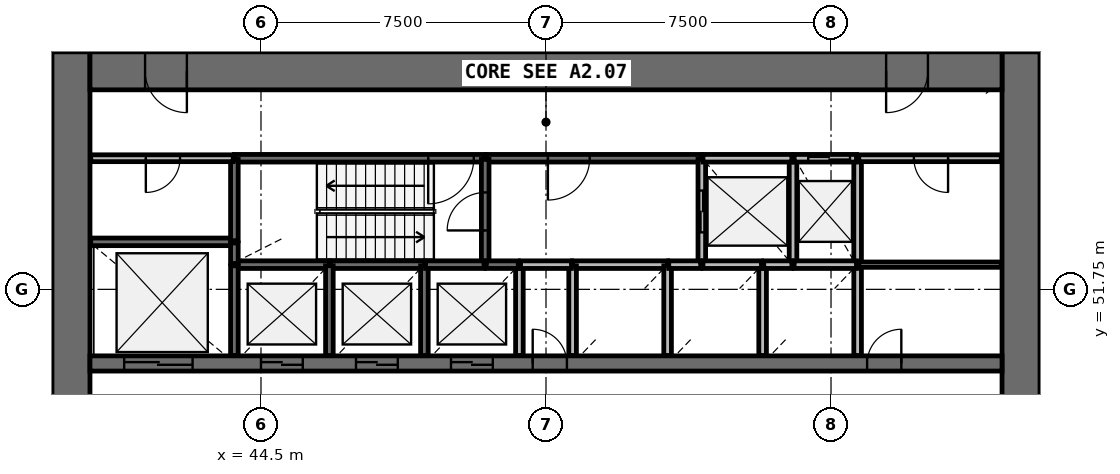
"""IFC4 building model, lengths in metres.
Left out: names, types, materials, properties, quantities, classifications, styles, units other than length and angle.
Written with IfcOpenShell. Run it as: python <this file> out.ifc"""

import sys

from ifc_helpers import new_model, si_unit, direction, frame, frame_2d, origin, place, context, subcontext, project, spatial, rectangle, extrude, source, transform, mapped, element, fill, save


model = new_model("IFC4")
c1 = context("Model", 3, precision=1e-05, world=origin(), true_north=direction((0.0, 1.0)))
c2 = subcontext(c1, "Body", "Model", "MODEL_VIEW")
j1 = project(units=[si_unit("LENGTHUNIT", "METRE"), si_unit("PLANEANGLEUNIT", "RADIAN")], contexts=[c1])
p1 = place(None, origin())
s1 = spatial("IfcSite", under=j1, at=p1, CompositionType="ELEMENT")
p2 = place(p1, origin())
s2 = spatial("IfcBuilding", under=s1, at=p2, CompositionType="ELEMENT")
p3 = place(p2, frame((0.0, 0.0, 27.0)))
s3 = spatial("IfcBuildingStorey", under=s2, at=p3, CompositionType="ELEMENT", Elevation=27.0)
p4 = place(p3, frame((64.5, 38.0, 0.0), z_axis=(0.0, 0.0, 1.0), x_axis=(0.0, 1.0, 0.0)))
e1 = element("IfcWall", 1, at=p4, inside=s3, PredefinedType="SHEAR", context=c2, shape_type="SweptSolid", body=[
    extrude(rectangle(XDim=20.0, YDim=1.0, at=frame_2d((10.0, 0.0))), origin(), (0.0, 0.0, 1.0), 4.4),
])
p5 = place(p4, frame((9.1, 0.0, 0.0)))
e2 = element("IfcOpeningElement", 2, at=p5, cuts=e1, PredefinedType="OPENING", context=c2, shape_type="SweptSolid", body=[
    extrude(rectangle(XDim=1.8, YDim=2.1, at=frame_2d((0.9, 1.05))), frame((0.0, 0.51, 0.0), z_axis=(0.0, -1.0, 0.0), x_axis=(1.0, 0.0, 0.0)), (0.0, 0.0, 1.0), 1.02),
])
p6 = place(p3, frame((39.5, 58.0, 0.0), z_axis=(0.0, 0.0, 1.0), x_axis=(0.0, -1.0, 0.0)))
e3 = element("IfcWall", 3, at=p6, inside=s3, PredefinedType="SHEAR", context=c2, shape_type="SweptSolid", body=[
    extrude(rectangle(XDim=20.0, YDim=1.0, at=frame_2d((10.0, 0.0))), origin(), (0.0, 0.0, 1.0), 4.4),
])
p7 = place(p6, frame((9.1, 0.0, 0.0)))
e4 = element("IfcOpeningElement", 4, at=p7, cuts=e3, PredefinedType="OPENING", context=c2, shape_type="SweptSolid", body=[
    extrude(rectangle(XDim=1.8, YDim=2.1, at=frame_2d((0.9, 1.05))), frame((0.0, 0.51, 0.0), z_axis=(0.0, -1.0, 0.0), x_axis=(1.0, 0.0, 0.0)), (0.0, 0.0, 1.0), 1.02),
])
p8 = place(p3, frame((64.0, 57.5, 0.0), z_axis=(0.0, 0.0, 1.0), x_axis=(-1.0, 0.0, 0.0)))
e5 = element("IfcWall", 5, at=p8, inside=s3, PredefinedType="SHEAR", context=c2, shape_type="SweptSolid", body=[
    extrude(rectangle(XDim=24.0, YDim=1.0, at=frame_2d((12.0, 0.0))), origin(), (0.0, 0.0, 1.0), 4.4),
])
p9 = place(p8, frame((21.45, 0.0, 0.0)))
e6 = element("IfcOpeningElement", 6, at=p9, cuts=e5, PredefinedType="OPENING", context=c2, shape_type="SweptSolid", body=[
    extrude(rectangle(XDim=1.1, YDim=2.1, at=frame_2d((0.55, 1.05))), frame((0.0, 0.51, 0.0), z_axis=(0.0, -1.0, 0.0), x_axis=(1.0, 0.0, 0.0)), (0.0, 0.0, 1.0), 1.02),
])
p10 = place(p8, frame((1.95, 0.0, 0.0)))
e7 = element("IfcOpeningElement", 7, at=p10, cuts=e5, PredefinedType="OPENING", context=c2, shape_type="SweptSolid", body=[
    extrude(rectangle(XDim=1.1, YDim=2.1, at=frame_2d((0.55, 1.05))), frame((0.0, 0.51, 0.0), z_axis=(0.0, -1.0, 0.0), x_axis=(1.0, 0.0, 0.0)), (0.0, 0.0, 1.0), 1.02),
])
p11 = place(p3, frame((40.0, 49.8, 0.0), z_axis=(0.0, 0.0, 1.0), x_axis=(1.0, 0.0, 0.0)))
e8 = element("IfcWall", 8, at=p11, inside=s3, PredefinedType="SHEAR", context=c2, shape_type="SweptSolid", body=[
    extrude(rectangle(XDim=24.0, YDim=0.4, at=frame_2d((12.0, 0.0))), origin(), (0.0, 0.0, 1.0), 4.4),
])
p12 = place(p11, frame((4.5, 0.0, 0.0)))
e9 = element("IfcOpeningElement", 9, at=p12, cuts=e8, PredefinedType="OPENING", context=c2, shape_type="SweptSolid", body=[
    extrude(rectangle(XDim=1.1, YDim=2.1, at=frame_2d((0.55, 1.05))), frame((0.0, 0.21, 0.0), z_axis=(0.0, -1.0, 0.0), x_axis=(1.0, 0.0, 0.0)), (0.0, 0.0, 1.0), 0.42),
])
p13 = place(p11, frame((7.0, 0.0, 0.0)))
e10 = element("IfcOpeningElement", 10, at=p13, cuts=e8, PredefinedType="OPENING", context=c2, shape_type="SweptSolid", body=[
    extrude(rectangle(XDim=1.1, YDim=2.1, at=frame_2d((0.55, 1.05))), frame((0.0, 0.21, 0.0), z_axis=(0.0, -1.0, 0.0), x_axis=(1.0, 0.0, 0.0)), (0.0, 0.0, 1.0), 0.42),
])
p14 = place(p11, frame((9.5, 0.0, 0.0)))
e11 = element("IfcOpeningElement", 11, at=p14, cuts=e8, PredefinedType="OPENING", context=c2, shape_type="SweptSolid", body=[
    extrude(rectangle(XDim=1.1, YDim=2.1, at=frame_2d((0.55, 1.05))), frame((0.0, 0.21, 0.0), z_axis=(0.0, -1.0, 0.0), x_axis=(1.0, 0.0, 0.0)), (0.0, 0.0, 1.0), 0.42),
])
p15 = place(p11, frame((0.9, 0.0, 0.0)))
e12 = element("IfcOpeningElement", 12, at=p15, cuts=e8, PredefinedType="OPENING", context=c2, shape_type="SweptSolid", body=[
    extrude(rectangle(XDim=1.8, YDim=2.4, at=frame_2d((0.9, 1.2))), frame((0.0, 0.21, 0.0), z_axis=(0.0, -1.0, 0.0), x_axis=(1.0, 0.0, 0.0)), (0.0, 0.0, 1.0), 0.42),
])
p16 = place(p11, frame((20.45, 0.0, 0.0)))
e13 = element("IfcOpeningElement", 13, at=p16, cuts=e8, PredefinedType="OPENING", context=c2, shape_type="SweptSolid", body=[
    extrude(rectangle(XDim=0.9, YDim=2.1, at=frame_2d((0.45, 1.05))), frame((0.0, 0.21, 0.0), z_axis=(0.0, -1.0, 0.0), x_axis=(1.0, 0.0, 0.0)), (0.0, 0.0, 1.0), 0.42),
])
p17 = place(p11, frame((11.65, 0.0, 0.0)))
e14 = element("IfcOpeningElement", 14, at=p17, cuts=e8, PredefinedType="OPENING", context=c2, shape_type="SweptSolid", body=[
    extrude(rectangle(XDim=0.9, YDim=2.1, at=frame_2d((0.45, 1.05))), frame((0.0, 0.21, 0.0), z_axis=(0.0, -1.0, 0.0), x_axis=(1.0, 0.0, 0.0)), (0.0, 0.0, 1.0), 0.42),
])
p18 = place(p3, frame((50.4, 55.2, 0.0), z_axis=(0.0, 0.0, 1.0), x_axis=(-1.0, 0.0, 0.0)))
e15 = element("IfcWall", 15, at=p18, inside=s3, PredefinedType="SOLIDWALL", context=c2, shape_type="SweptSolid", body=[
    extrude(rectangle(XDim=6.6, YDim=0.2, at=frame_2d((3.3, 0.0))), origin(), (0.0, 0.0, 1.0), 3.95),
])
p19 = place(p18, frame((0.3, 0.0, 0.0)))
e16 = element("IfcOpeningElement", 16, at=p19, cuts=e15, PredefinedType="OPENING", context=c2, shape_type="SweptSolid", body=[
    extrude(rectangle(XDim=1.2, YDim=2.1, at=frame_2d((0.6, 1.05))), frame((0.0, 0.11, 0.0), z_axis=(0.0, -1.0, 0.0), x_axis=(1.0, 0.0, 0.0)), (0.0, 0.0, 1.0), 0.22),
])
p20 = place(p3, frame((56.1, 55.2, 0.0), z_axis=(0.0, 0.0, 1.0), x_axis=(-1.0, 0.0, 0.0)))
e17 = element("IfcWall", 17, at=p20, inside=s3, PredefinedType="SOLIDWALL", context=c2, shape_type="SweptSolid", body=[
    extrude(rectangle(XDim=5.67, YDim=0.2, at=frame_2d((2.835, 0.0))), origin(), (0.0, 0.0, 1.0), 3.95),
])
p21 = place(p20, frame((2.95, 0.0, 0.0)))
e18 = element("IfcOpeningElement", 18, at=p21, cuts=e17, PredefinedType="OPENING", context=c2, shape_type="SweptSolid", body=[
    extrude(rectangle(XDim=1.1, YDim=2.1, at=frame_2d((0.55, 1.05))), frame((0.0, 0.11, 0.0), z_axis=(0.0, -1.0, 0.0), x_axis=(1.0, 0.0, 0.0)), (0.0, 0.0, 1.0), 0.22),
])
p22 = place(p3, frame((43.8, 53.0, 0.0), z_axis=(0.0, 0.0, 1.0), x_axis=(-1.0, 0.0, 0.0)))
e19 = element("IfcWall", 19, at=p22, inside=s3, PredefinedType="SOLIDWALL", context=c2, shape_type="SweptSolid", body=[
    extrude(rectangle(XDim=3.78, YDim=0.2, at=frame_2d((1.89, 0.0))), origin(), (0.0, 0.0, 1.0), 3.95),
])
p23 = place(p3, frame((50.4, 52.4, 0.0), z_axis=(0.0, 0.0, 1.0), x_axis=(0.0, 1.0, 0.0)))
e20 = element("IfcWall", 20, at=p23, inside=s3, PredefinedType="SOLIDWALL", context=c2, shape_type="SweptSolid", body=[
    extrude(rectangle(XDim=2.77, YDim=0.2, at=frame_2d((1.385, 0.0))), origin(), (0.0, 0.0, 1.0), 3.95),
])
p24 = place(p23, frame((0.9, 0.0, 0.0)))
e21 = element("IfcOpeningElement", 21, at=p24, cuts=e20, PredefinedType="OPENING", context=c2, shape_type="SweptSolid", body=[
    extrude(rectangle(XDim=1.0, YDim=2.1, at=frame_2d((0.5, 1.05))), frame((0.0, 0.11, 0.0), z_axis=(0.0, -1.0, 0.0), x_axis=(1.0, 0.0, 0.0)), (0.0, 0.0, 1.0), 0.22),
])
p25 = place(p3, frame((56.1, 55.17, 0.0), z_axis=(0.0, 0.0, 1.0), x_axis=(0.0, -1.0, 0.0)))
e22 = element("IfcWall", 22, at=p25, inside=s3, PredefinedType="SOLIDWALL", context=c2, shape_type="SweptSolid", body=[
    extrude(rectangle(XDim=2.77, YDim=0.2, at=frame_2d((1.385, 0.0))), origin(), (0.0, 0.0, 1.0), 3.95),
])
p26 = place(p25, frame((0.82, 0.0, 0.0)))
e23 = element("IfcOpeningElement", 23, at=p26, cuts=e22, PredefinedType="OPENING", context=c2, shape_type="SweptSolid", body=[
    extrude(rectangle(XDim=1.1, YDim=2.1, at=frame_2d((0.55, 1.05))), frame((0.0, 0.11, 0.0), z_axis=(0.0, -1.0, 0.0), x_axis=(1.0, 0.0, 0.0)), (0.0, 0.0, 1.0), 0.22),
])
for number, where, z_axis, x_axis in (
    (24, (58.5, 52.4, 0.0), (0.0, 0.0, 1.0), (0.0, 1.0, 0.0)),
    (25, (60.2, 52.4, 0.0), (0.0, 0.0, 1.0), (0.0, 1.0, 0.0)),
):
    element("IfcWall", number, at=place(p3, frame(where, z_axis=z_axis, x_axis=x_axis)), inside=s3, PredefinedType="SOLIDWALL", context=c2, shape_type="SweptSolid", body=[
        extrude(rectangle(XDim=2.8, YDim=0.2, at=frame_2d((1.4, 0.0))), origin(), (0.0, 0.0, 1.0), 3.95),
    ])
p27 = place(p3, frame((46.3, 52.4, 0.0), z_axis=(0.0, 0.0, 1.0), x_axis=(-1.0, 0.0, 0.0)))
e26 = element("IfcWall", 26, at=p27, inside=s3, PredefinedType="SOLIDWALL", context=c2, shape_type="SweptSolid", body=[
    extrude(rectangle(XDim=2.5, YDim=0.2, at=frame_2d((1.25, 0.0))), origin(), (0.0, 0.0, 1.0), 3.95),
])
p28 = place(p3, frame((48.8, 52.4, 0.0), z_axis=(0.0, 0.0, 1.0), x_axis=(-1.0, 0.0, 0.0)))
e27 = element("IfcWall", 27, at=p28, inside=s3, PredefinedType="SOLIDWALL", context=c2, shape_type="SweptSolid", body=[
    extrude(rectangle(XDim=2.47, YDim=0.2, at=frame_2d((1.235, 0.0))), origin(), (0.0, 0.0, 1.0), 3.95),
])
p29 = place(p3, frame((55.2, 52.4, 0.0), z_axis=(0.0, 0.0, 1.0), x_axis=(-1.0, 0.0, 0.0)))
e28 = element("IfcWall", 28, at=p29, inside=s3, PredefinedType="SOLIDWALL", context=c2, shape_type="SweptSolid", body=[
    extrude(rectangle(XDim=2.5, YDim=0.2, at=frame_2d((1.25, 0.0))), origin(), (0.0, 0.0, 1.0), 3.95),
])
p30 = place(p3, frame((58.47, 55.2, 0.0), z_axis=(0.0, 0.0, 1.0), x_axis=(-1.0, 0.0, 0.0)))
e29 = element("IfcWall", 29, at=p30, inside=s3, PredefinedType="SOLIDWALL", context=c2, shape_type="SweptSolid", body=[
    extrude(rectangle(XDim=2.34, YDim=0.2, at=frame_2d((1.17, 0.0))), origin(), (0.0, 0.0, 1.0), 3.95),
])
for number, where, z_axis, x_axis in (
    (30, (43.8, 52.37, 0.0), (0.0, 0.0, 1.0), (0.0, -1.0, 0.0)),
    (31, (46.3, 50.01, 0.0), (0.0, 0.0, 1.0), (0.0, 1.0, 0.0)),
    (32, (48.8, 50.01, 0.0), (0.0, 0.0, 1.0), (0.0, 1.0, 0.0)),
):
    element("IfcWall", number, at=place(p3, frame(where, z_axis=z_axis, x_axis=x_axis)), inside=s3, PredefinedType="SOLIDWALL", context=c2, shape_type="SweptSolid", body=[
        extrude(rectangle(XDim=2.36, YDim=0.2, at=frame_2d((1.18, 0.0))), origin(), (0.0, 0.0, 1.0), 3.95),
    ])
p31 = place(p3, frame((51.3, 50.01, 0.0), z_axis=(0.0, 0.0, 1.0), x_axis=(0.0, 1.0, 0.0)))
e33 = element("IfcWall", 33, at=p31, inside=s3, PredefinedType="SOLIDWALL", context=c2, shape_type="SweptSolid", body=[
    extrude(rectangle(XDim=2.39, YDim=0.2, at=frame_2d((1.195, 0.0))), origin(), (0.0, 0.0, 1.0), 3.95),
])
for number, where, z_axis, x_axis in (
    (34, (52.7, 52.37, 0.0), (0.0, 0.0, 1.0), (0.0, -1.0, 0.0)),
    (35, (55.2, 50.01, 0.0), (0.0, 0.0, 1.0), (0.0, 1.0, 0.0)),
):
    element("IfcWall", number, at=place(p3, frame(where, z_axis=z_axis, x_axis=x_axis)), inside=s3, PredefinedType="SOLIDWALL", context=c2, shape_type="SweptSolid", body=[
        extrude(rectangle(XDim=2.36, YDim=0.2, at=frame_2d((1.18, 0.0))), origin(), (0.0, 0.0, 1.0), 3.95),
    ])
p32 = place(p3, frame((57.7, 50.01, 0.0), z_axis=(0.0, 0.0, 1.0), x_axis=(0.0, 1.0, 0.0)))
e36 = element("IfcWall", 36, at=p32, inside=s3, PredefinedType="SOLIDWALL", context=c2, shape_type="SweptSolid", body=[
    extrude(rectangle(XDim=2.39, YDim=0.2, at=frame_2d((1.195, 0.0))), origin(), (0.0, 0.0, 1.0), 3.95),
])
p33 = place(p3, frame((60.2, 50.01, 0.0), z_axis=(0.0, 0.0, 1.0), x_axis=(0.0, 1.0, 0.0)))
e37 = element("IfcWall", 37, at=p33, inside=s3, PredefinedType="SOLIDWALL", context=c2, shape_type="SweptSolid", body=[
    extrude(rectangle(XDim=2.36, YDim=0.2, at=frame_2d((1.18, 0.0))), origin(), (0.0, 0.0, 1.0), 3.95),
])
p34 = place(p3, frame((43.8, 55.17, 0.0), z_axis=(0.0, 0.0, 1.0), x_axis=(0.0, -1.0, 0.0)))
e38 = element("IfcWall", 38, at=p34, inside=s3, PredefinedType="SOLIDWALL", context=c2, shape_type="SweptSolid", body=[
    extrude(rectangle(XDim=2.14, YDim=0.2, at=frame_2d((1.07, 0.0))), origin(), (0.0, 0.0, 1.0), 3.95),
])
p35 = place(p3, frame((60.17, 52.4, 0.0), z_axis=(0.0, 0.0, 1.0), x_axis=(-1.0, 0.0, 0.0)))
e39 = element("IfcWall", 39, at=p35, inside=s3, PredefinedType="SOLIDWALL", context=c2, shape_type="SweptSolid", body=[
    extrude(rectangle(XDim=1.64, YDim=0.2, at=frame_2d((0.82, 0.0))), origin(), (0.0, 0.0, 1.0), 3.95),
])
p36 = place(p3, frame((60.17, 55.2, 0.0), z_axis=(0.0, 0.0, 1.0), x_axis=(-1.0, 0.0, 0.0)))
e40 = element("IfcWall", 40, at=p36, inside=s3, PredefinedType="SOLIDWALL", context=c2, shape_type="SweptSolid", body=[
    extrude(rectangle(XDim=1.64, YDim=0.2, at=frame_2d((0.82, 0.0))), origin(), (0.0, 0.0, 1.0), 3.95),
])
p37 = place(p36, frame((0.17, 0.0, 0.0)))
e41 = element("IfcOpeningElement", 41, at=p37, cuts=e40, PredefinedType="OPENING", context=c2, shape_type="SweptSolid", body=[
    extrude(rectangle(XDim=1.1, YDim=2.1, at=frame_2d((0.55, 1.05))), frame((0.0, 0.11, 0.0), z_axis=(0.0, -1.0, 0.0), x_axis=(1.0, 0.0, 0.0)), (0.0, 0.0, 1.0), 0.22),
])
for number, where, z_axis, x_axis in (
    (42, (50.37, 52.4, 0.0), (0.0, 0.0, 1.0), (-1.0, 0.0, 0.0)),
    (43, (57.67, 52.4, 0.0), (0.0, 0.0, 1.0), (-1.0, 0.0, 0.0)),
):
    element("IfcWall", number, at=place(p3, frame(where, z_axis=z_axis, x_axis=x_axis)), inside=s3, PredefinedType="SOLIDWALL", context=c2, shape_type="SweptSolid", body=[
        extrude(rectangle(XDim=1.54, YDim=0.2, at=frame_2d((0.77, 0.0))), origin(), (0.0, 0.0, 1.0), 3.95),
    ])
p38 = place(p3, frame((51.33, 52.4, 0.0), z_axis=(0.0, 0.0, 1.0), x_axis=(1.0, 0.0, 0.0)))
e44 = element("IfcWall", 44, at=p38, inside=s3, PredefinedType="SOLIDWALL", context=c2, shape_type="SweptSolid", body=[
    extrude(rectangle(XDim=1.34, YDim=0.2, at=frame_2d((0.67, 0.0))), origin(), (0.0, 0.0, 1.0), 3.95),
])
for number, where, z_axis, x_axis in (
    (45, (51.27, 52.4, 0.0), (0.0, 0.0, 1.0), (-1.0, 0.0, 0.0)),
    (46, (56.07, 52.4, 0.0), (0.0, 0.0, 1.0), (-1.0, 0.0, 0.0)),
):
    element("IfcWall", number, at=place(p3, frame(where, z_axis=z_axis, x_axis=x_axis)), inside=s3, PredefinedType="SOLIDWALL", context=c2, shape_type="SweptSolid", body=[
        extrude(rectangle(XDim=0.84, YDim=0.2, at=frame_2d((0.42, 0.0))), origin(), (0.0, 0.0, 1.0), 3.95),
    ])
p39 = place(p3, frame((58.47, 52.4, 0.0), z_axis=(0.0, 0.0, 1.0), x_axis=(-1.0, 0.0, 0.0)))
e47 = element("IfcWall", 47, at=p39, inside=s3, PredefinedType="SOLIDWALL", context=c2, shape_type="SweptSolid", body=[
    extrude(rectangle(XDim=0.74, YDim=0.2, at=frame_2d((0.37, 0.0))), origin(), (0.0, 0.0, 1.0), 3.95),
])
p40 = place(p3, frame((43.8, 52.43, 0.0), z_axis=(0.0, 0.0, 1.0), x_axis=(0.0, 1.0, 0.0)))
e48 = element("IfcWall", 48, at=p40, inside=s3, PredefinedType="SOLIDWALL", context=c2, shape_type="SweptSolid", body=[
    extrude(rectangle(XDim=0.54, YDim=0.2, at=frame_2d((0.27, 0.0))), origin(), (0.0, 0.0, 1.0), 3.95),
])
p41 = place(p3, frame((43.77, 55.2, 0.0), z_axis=(0.0, 0.0, 1.0), x_axis=(-1.0, 0.0, 0.0)))
e49 = element("IfcWall", 49, at=p41, inside=s3, PredefinedType="PARTITIONING", context=c2, shape_type="SweptSolid", body=[
    extrude(rectangle(XDim=3.75, YDim=0.18, at=frame_2d((1.875, 0.0))), origin(), (0.0, 0.0, 1.0), 3.95),
])
p42 = place(p41, frame((1.4, 0.0, 0.0)))
e50 = element("IfcOpeningElement", 50, at=p42, cuts=e49, PredefinedType="OPENING", context=c2, shape_type="SweptSolid", body=[
    extrude(rectangle(XDim=0.9, YDim=2.1, at=frame_2d((0.45, 1.05))), frame((0.0, 0.1, 0.0), z_axis=(0.0, -1.0, 0.0), x_axis=(1.0, 0.0, 0.0)), (0.0, 0.0, 1.0), 0.2),
])
p43 = place(p3, frame((63.98, 55.2, 0.0), z_axis=(0.0, 0.0, 1.0), x_axis=(-1.0, 0.0, 0.0)))
e51 = element("IfcWall", 51, at=p43, inside=s3, PredefinedType="PARTITIONING", context=c2, shape_type="SweptSolid", body=[
    extrude(rectangle(XDim=3.75, YDim=0.18, at=frame_2d((1.875, 0.0))), origin(), (0.0, 0.0, 1.0), 3.95),
])
p44 = place(p43, frame((1.4, 0.0, 0.0)))
e52 = element("IfcOpeningElement", 52, at=p44, cuts=e51, PredefinedType="OPENING", context=c2, shape_type="SweptSolid", body=[
    extrude(rectangle(XDim=0.9, YDim=2.1, at=frame_2d((0.45, 1.05))), frame((0.0, 0.1, 0.0), z_axis=(0.0, -1.0, 0.0), x_axis=(1.0, 0.0, 0.0)), (0.0, 0.0, 1.0), 0.2),
])
p45 = place(p3, frame((63.98, 52.4, 0.0), z_axis=(0.0, 0.0, 1.0), x_axis=(-1.0, 0.0, 0.0)))
e53 = element("IfcWall", 53, at=p45, inside=s3, PredefinedType="PARTITIONING", context=c2, shape_type="SweptSolid", body=[
    extrude(rectangle(XDim=3.75, YDim=0.14, at=frame_2d((1.875, 0.0))), origin(), (0.0, 0.0, 1.0), 3.05),
])
m1 = source(origin(), c2, "Body", "SweptSolid", [
    extrude(rectangle(XDim=1.1, YDim=2.1, at=frame_2d((0.55, 1.05))), frame((0.0, 0.025, 0.0), z_axis=(0.0, -1.0, 0.0), x_axis=(1.0, 0.0, 0.0)), (0.0, 0.0, 1.0), 0.05),
])
p46 = place(p12, origin())
e54 = element("IfcDoor", 54, at=p46, inside=s3, OperationType="DOUBLE_DOOR_SLIDING", PredefinedType="USERDEFINED", context=c2, shape_type="MappedRepresentation", body=[
    mapped(m1, transform((0.0, 0.0, 0.0), scale=1.0)),
])
fill(e9, e54)
p47 = place(p13, origin())
e55 = element("IfcDoor", 55, at=p47, inside=s3, OperationType="DOUBLE_DOOR_SLIDING", PredefinedType="USERDEFINED", context=c2, shape_type="MappedRepresentation", body=[
    mapped(m1, transform((0.0, 0.0, 0.0), scale=1.0)),
])
fill(e10, e55)
p48 = place(p14, origin())
e56 = element("IfcDoor", 56, at=p48, inside=s3, OperationType="DOUBLE_DOOR_SLIDING", PredefinedType="USERDEFINED", context=c2, shape_type="MappedRepresentation", body=[
    mapped(m1, transform((0.0, 0.0, 0.0), scale=1.0)),
])
fill(e11, e56)
p49 = place(p26, origin())
e57 = element("IfcDoor", 57, at=p49, inside=s3, OperationType="DOUBLE_DOOR_SLIDING", PredefinedType="USERDEFINED", context=c2, shape_type="MappedRepresentation", body=[
    mapped(m1, transform((0.0, 0.0, 0.0), scale=1.0)),
])
fill(e23, e57)
p50 = place(p37, origin())
e58 = element("IfcDoor", 58, at=p50, inside=s3, OperationType="DOUBLE_DOOR_SLIDING", PredefinedType="USERDEFINED", context=c2, shape_type="MappedRepresentation", body=[
    mapped(m1, transform((0.0, 0.0, 0.0), scale=1.0)),
])
fill(e41, e58)
m2 = source(origin(), c2, "Body", "SweptSolid", [
    extrude(rectangle(XDim=1.8, YDim=2.4, at=frame_2d((0.9, 1.2))), frame((0.0, 0.025, 0.0), z_axis=(0.0, -1.0, 0.0), x_axis=(1.0, 0.0, 0.0)), (0.0, 0.0, 1.0), 0.05),
])
p51 = place(p15, origin())
e59 = element("IfcDoor", 59, at=p51, inside=s3, OperationType="DOUBLE_DOOR_SLIDING", PredefinedType="USERDEFINED", context=c2, shape_type="MappedRepresentation", body=[
    mapped(m2, transform((0.0, 0.0, 0.0), scale=1.0)),
])
fill(e12, e59)
m3 = source(origin(), c2, "Body", "SweptSolid", [
    extrude(rectangle(XDim=1.2, YDim=2.1, at=frame_2d((0.6, 1.05))), frame((0.0, 0.025, 0.0), z_axis=(0.0, -1.0, 0.0), x_axis=(1.0, 0.0, 0.0)), (0.0, 0.0, 1.0), 0.05),
])
p52 = place(p19, origin())
e60 = element("IfcDoor", 60, at=p52, inside=s3, OperationType="SINGLE_SWING_RIGHT", PredefinedType="DOOR", context=c2, shape_type="MappedRepresentation", body=[
    mapped(m3, transform((0.0, 0.0, 0.0), scale=1.0)),
])
fill(e16, e60)
m4 = source(origin(), c2, "Body", "SweptSolid", [
    extrude(rectangle(XDim=1.0, YDim=2.1, at=frame_2d((0.5, 1.05))), frame((0.0, 0.025, 0.0), z_axis=(0.0, -1.0, 0.0), x_axis=(1.0, 0.0, 0.0)), (0.0, 0.0, 1.0), 0.05),
])
p53 = place(p24, origin())
e61 = element("IfcDoor", 61, at=p53, inside=s3, OperationType="SINGLE_SWING_LEFT", PredefinedType="DOOR", context=c2, shape_type="MappedRepresentation", body=[
    mapped(m4, transform((0.0, 0.0, 0.0), scale=1.0)),
])
fill(e21, e61)
m5 = source(origin(), c2, "Body", "SweptSolid", [
    extrude(rectangle(XDim=1.1, YDim=2.1, at=frame_2d((0.55, 1.05))), frame((0.0, 0.025, 0.0), z_axis=(0.0, -1.0, 0.0), x_axis=(1.0, 0.0, 0.0)), (0.0, 0.0, 1.0), 0.05),
])
p54 = place(p21, origin())
e62 = element("IfcDoor", 62, at=p54, inside=s3, OperationType="SINGLE_SWING_RIGHT", PredefinedType="DOOR", context=c2, shape_type="MappedRepresentation", body=[
    mapped(m5, transform((0.0, 0.0, 0.0), scale=1.0)),
])
fill(e18, e62)
m6 = source(origin(), c2, "Body", "SweptSolid", [
    extrude(rectangle(XDim=1.1, YDim=2.1, at=frame_2d((0.55, 1.05))), frame((0.0, 0.025, 0.0), z_axis=(0.0, -1.0, 0.0), x_axis=(1.0, 0.0, 0.0)), (0.0, 0.0, 1.0), 0.05),
])
p55 = place(p9, origin())
e63 = element("IfcDoor", 63, at=p55, inside=s3, OperationType="SINGLE_SWING_LEFT", PredefinedType="DOOR", context=c2, shape_type="MappedRepresentation", body=[
    mapped(m6, transform((0.0, 0.0, 0.0), scale=1.0)),
])
fill(e6, e63)
p56 = place(p10, origin())
e64 = element("IfcDoor", 64, at=p56, inside=s3, OperationType="SINGLE_SWING_RIGHT", PredefinedType="DOOR", context=c2, shape_type="MappedRepresentation", body=[
    mapped(m6, transform((0.0, 0.0, 0.0), scale=1.0)),
])
fill(e7, e64)
m7 = source(origin(), c2, "Body", "SweptSolid", [
    extrude(rectangle(XDim=0.9, YDim=2.1, at=frame_2d((0.45, 1.05))), frame((0.0, 0.025, 0.0), z_axis=(0.0, -1.0, 0.0), x_axis=(1.0, 0.0, 0.0)), (0.0, 0.0, 1.0), 0.05),
])
p57 = place(p42, origin())
e65 = element("IfcDoor", 65, at=p57, inside=s3, OperationType="SINGLE_SWING_RIGHT", PredefinedType="DOOR", context=c2, shape_type="MappedRepresentation", body=[
    mapped(m7, transform((0.0, 0.0, 0.0), scale=1.0)),
])
fill(e50, e65)
p58 = place(p16, origin())
e66 = element("IfcDoor", 66, at=p58, inside=s3, OperationType="SINGLE_SWING_RIGHT", PredefinedType="DOOR", context=c2, shape_type="MappedRepresentation", body=[
    mapped(m7, transform((0.0, 0.0, 0.0), scale=1.0)),
])
fill(e13, e66)
p59 = place(p44, origin())
e67 = element("IfcDoor", 67, at=p59, inside=s3, OperationType="SINGLE_SWING_LEFT", PredefinedType="DOOR", context=c2, shape_type="MappedRepresentation", body=[
    mapped(m7, transform((0.0, 0.0, 0.0), scale=1.0)),
])
fill(e52, e67)
p60 = place(p17, origin())
e68 = element("IfcDoor", 68, at=p60, inside=s3, OperationType="SINGLE_SWING_LEFT", PredefinedType="DOOR", context=c2, shape_type="MappedRepresentation", body=[
    mapped(m7, transform((0.0, 0.0, 0.0), scale=1.0)),
])
fill(e14, e68)
save(model, sys.argv[1])
